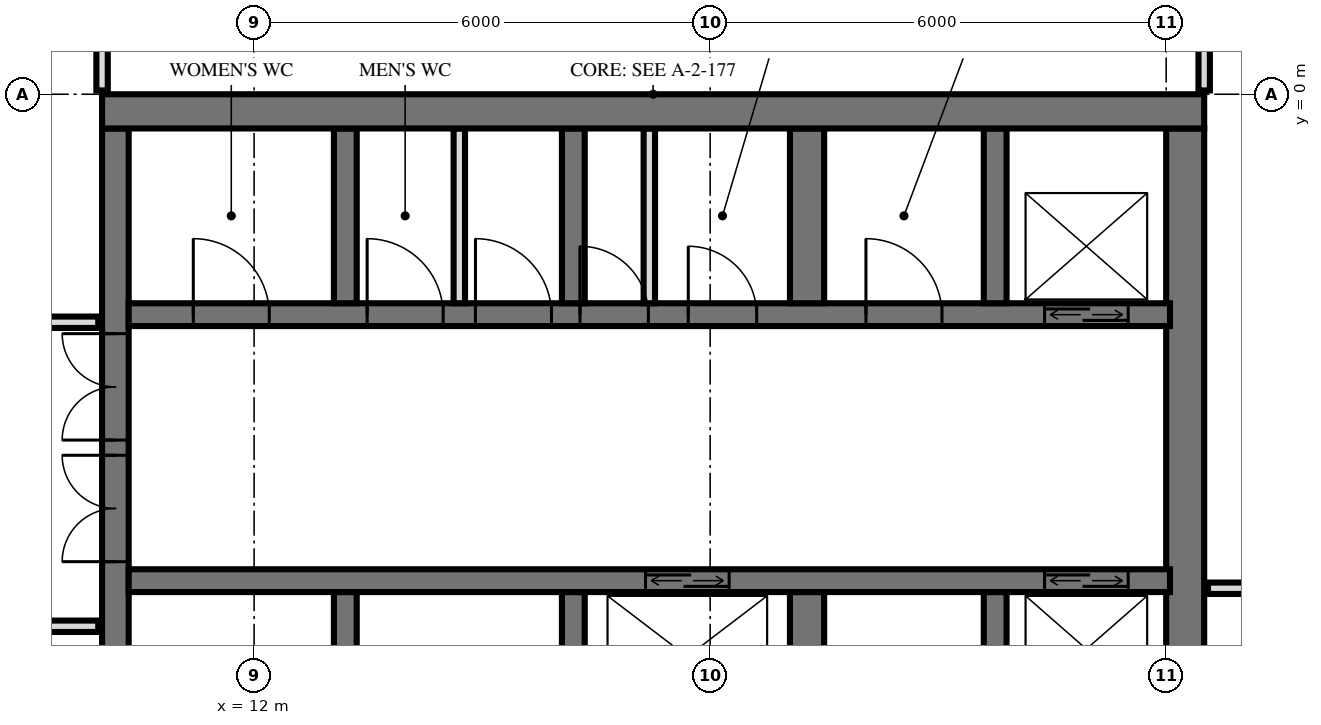
"""IFC4 building model, lengths in metres.
Left out: names, types, materials, properties, quantities, classifications, styles, units other than length and angle.
Written with IfcOpenShell. Run it as: python <this file> out.ifc"""

import sys

from ifc_helpers import new_model, si_unit, direction, frame, frame_2d, origin, place, context, subcontext, project, spatial, rectangle, extrude, element, fill, save


model = new_model("IFC4")
c1 = context("Model", 3, precision=1e-05, world=origin(), true_north=direction((0.0, 1.0)))
c2 = subcontext(c1, "Body", "Model", "MODEL_VIEW")
j1 = project(units=[si_unit("LENGTHUNIT", "METRE"), si_unit("PLANEANGLEUNIT", "RADIAN")], contexts=[c1])
p1 = place(None, origin())
s1 = spatial("IfcSite", under=j1, at=p1, CompositionType="ELEMENT")
p2 = place(p1, origin())
s2 = spatial("IfcBuilding", under=s1, at=p2, CompositionType="ELEMENT")
p3 = place(p2, frame((0.0, 0.0, 163.2)))
s3 = spatial("IfcBuildingStorey", under=s2, at=p3, CompositionType="ELEMENT", Elevation=163.2)
p4 = place(p3, frame((10.0, -0.225, 0.0), z_axis=(0.0, 0.0, 1.0), x_axis=(1.0, 0.0, 0.0)))
e1 = element("IfcWall", 1, at=p4, inside=s3, PredefinedType="SHEAR", context=c2, shape_type="SweptSolid", body=[
    extrude(rectangle(XDim=14.5, YDim=0.45, at=frame_2d((7.25, 0.0))), origin(), (0.0, 0.0, 1.0), 3.6),
])
p5 = place(p3, frame((10.175, -14.55, 0.0), z_axis=(0.0, 0.0, 1.0), x_axis=(0.0, 1.0, 0.0)))
e2 = element("IfcWall", 2, at=p5, inside=s3, PredefinedType="SHEAR", context=c2, shape_type="SweptSolid", body=[
    extrude(rectangle(XDim=14.1, YDim=0.35, at=frame_2d((7.05, 0.0))), origin(), (0.0, 0.0, 1.0), 3.6),
])
p6 = place(p5, frame((8.4, 0.0, 0.0)))
e3 = element("IfcOpeningElement", 3, at=p6, cuts=e2, PredefinedType="OPENING", context=c2, shape_type="SweptSolid", body=[
    extrude(rectangle(XDim=1.4, YDim=2.4, at=frame_2d((0.7, 1.2))), frame((0.0, 0.185, 0.0), z_axis=(0.0, -1.0, 0.0), x_axis=(1.0, 0.0, 0.0)), (0.0, 0.0, 1.0), 0.37),
])
p7 = place(p5, frame((10.0, 0.0, 0.0)))
e4 = element("IfcOpeningElement", 4, at=p7, cuts=e2, PredefinedType="OPENING", context=c2, shape_type="SweptSolid", body=[
    extrude(rectangle(XDim=1.4, YDim=2.4, at=frame_2d((0.7, 1.2))), frame((0.0, 0.185, 0.0), z_axis=(0.0, -1.0, 0.0), x_axis=(1.0, 0.0, 0.0)), (0.0, 0.0, 1.0), 0.37),
])
p8 = place(p5, frame((4.0, 0.0, 0.0)))
e5 = element("IfcOpeningElement", 5, at=p8, cuts=e2, PredefinedType="OPENING", context=c2, shape_type="SweptSolid", body=[
    extrude(rectangle(XDim=1.2, YDim=2.1, at=frame_2d((0.6, 1.05))), frame((0.0, 0.185, 0.0), z_axis=(0.0, -1.0, 0.0), x_axis=(1.0, 0.0, 0.0)), (0.0, 0.0, 1.0), 0.37),
])
p9 = place(p3, frame((24.25, -14.55, 0.0), z_axis=(0.0, 0.0, 1.0), x_axis=(0.0, 1.0, 0.0)))
e6 = element("IfcWall", 6, at=p9, inside=s3, PredefinedType="SHEAR", context=c2, shape_type="SweptSolid", body=[
    extrude(rectangle(XDim=14.1, YDim=0.5, at=frame_2d((7.05, 0.0))), origin(), (0.0, 0.0, 1.0), 3.6),
])
p10 = place(p3, frame((10.35, -2.9, 0.0), z_axis=(0.0, 0.0, 1.0), x_axis=(1.0, 0.0, 0.0)))
e7 = element("IfcWall", 7, at=p10, inside=s3, PredefinedType="SHEAR", context=c2, shape_type="SweptSolid", body=[
    extrude(rectangle(XDim=13.7, YDim=0.3, at=frame_2d((6.85, 0.0))), origin(), (0.0, 0.0, 1.0), 3.6),
])
p11 = place(p10, frame((12.05, 0.0, 0.0)))
e8 = element("IfcOpeningElement", 8, at=p11, cuts=e7, PredefinedType="OPENING", context=c2, shape_type="SweptSolid", body=[
    extrude(rectangle(XDim=1.1, YDim=2.1, at=frame_2d((0.55, 1.05))), frame((0.0, 0.16, 0.0), z_axis=(0.0, -1.0, 0.0), x_axis=(1.0, 0.0, 0.0)), (0.0, 0.0, 1.0), 0.32),
])
p12 = place(p10, frame((5.938, 0.0, 0.0)))
e9 = element("IfcOpeningElement", 9, at=p12, cuts=e7, PredefinedType="OPENING", context=c2, shape_type="SweptSolid", body=[
    extrude(rectangle(XDim=0.9, YDim=2.1, at=frame_2d((0.45, 1.05))), frame((0.0, 0.16, 0.0), z_axis=(0.0, -1.0, 0.0), x_axis=(1.0, 0.0, 0.0)), (0.0, 0.0, 1.0), 0.32),
])
p13 = place(p10, frame((7.363, 0.0, 0.0)))
e10 = element("IfcOpeningElement", 10, at=p13, cuts=e7, PredefinedType="OPENING", context=c2, shape_type="SweptSolid", body=[
    extrude(rectangle(XDim=0.9, YDim=2.1, at=frame_2d((0.45, 1.05))), frame((0.0, 0.16, 0.0), z_axis=(0.0, -1.0, 0.0), x_axis=(1.0, 0.0, 0.0)), (0.0, 0.0, 1.0), 0.32),
])
p14 = place(p10, frame((0.85, 0.0, 0.0)))
e11 = element("IfcOpeningElement", 11, at=p14, cuts=e7, PredefinedType="OPENING", context=c2, shape_type="SweptSolid", body=[
    extrude(rectangle(XDim=1.0, YDim=2.1, at=frame_2d((0.5, 1.05))), frame((0.0, 0.16, 0.0), z_axis=(0.0, -1.0, 0.0), x_axis=(1.0, 0.0, 0.0)), (0.0, 0.0, 1.0), 0.32),
])
p15 = place(p10, frame((3.137, 0.0, 0.0)))
e12 = element("IfcOpeningElement", 12, at=p15, cuts=e7, PredefinedType="OPENING", context=c2, shape_type="SweptSolid", body=[
    extrude(rectangle(XDim=1.0, YDim=2.1, at=frame_2d((0.5, 1.05))), frame((0.0, 0.16, 0.0), z_axis=(0.0, -1.0, 0.0), x_axis=(1.0, 0.0, 0.0)), (0.0, 0.0, 1.0), 0.32),
])
p16 = place(p10, frame((4.562, 0.0, 0.0)))
e13 = element("IfcOpeningElement", 13, at=p16, cuts=e7, PredefinedType="OPENING", context=c2, shape_type="SweptSolid", body=[
    extrude(rectangle(XDim=1.0, YDim=2.1, at=frame_2d((0.5, 1.05))), frame((0.0, 0.16, 0.0), z_axis=(0.0, -1.0, 0.0), x_axis=(1.0, 0.0, 0.0)), (0.0, 0.0, 1.0), 0.32),
])
p17 = place(p10, frame((9.7, 0.0, 0.0)))
e14 = element("IfcOpeningElement", 14, at=p17, cuts=e7, PredefinedType="OPENING", context=c2, shape_type="SweptSolid", body=[
    extrude(rectangle(XDim=1.0, YDim=2.1, at=frame_2d((0.5, 1.05))), frame((0.0, 0.16, 0.0), z_axis=(0.0, -1.0, 0.0), x_axis=(1.0, 0.0, 0.0)), (0.0, 0.0, 1.0), 0.32),
])
p18 = place(p3, frame((10.35, -6.4, 0.0), z_axis=(0.0, 0.0, 1.0), x_axis=(1.0, 0.0, 0.0)))
e15 = element("IfcWall", 15, at=p18, inside=s3, PredefinedType="SHEAR", context=c2, shape_type="SweptSolid", body=[
    extrude(rectangle(XDim=13.7, YDim=0.3, at=frame_2d((6.85, 0.0))), origin(), (0.0, 0.0, 1.0), 3.6),
])
p19 = place(p18, frame((12.05, 0.0, 0.0)))
e16 = element("IfcOpeningElement", 16, at=p19, cuts=e15, PredefinedType="OPENING", context=c2, shape_type="SweptSolid", body=[
    extrude(rectangle(XDim=1.1, YDim=2.1, at=frame_2d((0.55, 1.05))), frame((0.0, 0.16, 0.0), z_axis=(0.0, -1.0, 0.0), x_axis=(1.0, 0.0, 0.0)), (0.0, 0.0, 1.0), 0.32),
])
p20 = place(p18, frame((6.8, 0.0, 0.0)))
e17 = element("IfcOpeningElement", 17, at=p20, cuts=e15, PredefinedType="OPENING", context=c2, shape_type="SweptSolid", body=[
    extrude(rectangle(XDim=1.1, YDim=2.1, at=frame_2d((0.55, 1.05))), frame((0.0, 0.16, 0.0), z_axis=(0.0, -1.0, 0.0), x_axis=(1.0, 0.0, 0.0)), (0.0, 0.0, 1.0), 0.32),
])
for number, where, z_axis, x_axis in (
    (18, (13.2, -2.75, 0.0), (0.0, 0.0, 1.0), (0.0, 1.0, 0.0)),
    (19, (13.2, -8.85, 0.0), (0.0, 0.0, 1.0), (0.0, 1.0, 0.0)),
    (20, (16.2, -2.75, 0.0), (0.0, 0.0, 1.0), (0.0, 1.0, 0.0)),
    (21, (16.2, -8.85, 0.0), (0.0, 0.0, 1.0), (0.0, 1.0, 0.0)),
):
    element("IfcWall", number, at=place(p3, frame(where, z_axis=z_axis, x_axis=x_axis)), inside=s3, PredefinedType="SHEAR", context=c2, shape_type="SweptSolid", body=[
        extrude(rectangle(XDim=2.3, YDim=0.3, at=frame_2d((1.15, 0.0))), origin(), (0.0, 0.0, 1.0), 3.6),
    ])
for number, where, z_axis, x_axis in (
    (22, (19.275, -2.75, 0.0), (0.0, 0.0, 1.0), (0.0, 1.0, 0.0)),
    (23, (19.275, -8.85, 0.0), (0.0, 0.0, 1.0), (0.0, 1.0, 0.0)),
):
    element("IfcWall", number, at=place(p3, frame(where, z_axis=z_axis, x_axis=x_axis)), inside=s3, PredefinedType="SHEAR", context=c2, shape_type="SweptSolid", body=[
        extrude(rectangle(XDim=2.3, YDim=0.45, at=frame_2d((1.15, 0.0))), origin(), (0.0, 0.0, 1.0), 3.6),
    ])
for number, where, z_axis, x_axis in (
    (24, (21.75, -2.75, 0.0), (0.0, 0.0, 1.0), (0.0, 1.0, 0.0)),
    (25, (21.75, -8.85, 0.0), (0.0, 0.0, 1.0), (0.0, 1.0, 0.0)),
):
    element("IfcWall", number, at=place(p3, frame(where, z_axis=z_axis, x_axis=x_axis)), inside=s3, PredefinedType="SHEAR", context=c2, shape_type="SweptSolid", body=[
        extrude(rectangle(XDim=2.3, YDim=0.3, at=frame_2d((1.15, 0.0))), origin(), (0.0, 0.0, 1.0), 3.6),
    ])
for number, where, z_axis, x_axis in (
    (26, (17.2, -2.75, 0.0), (0.0, 0.0, 1.0), (0.0, 1.0, 0.0)),
    (27, (14.7, -2.75, 0.0), (0.0, 0.0, 1.0), (0.0, 1.0, 0.0)),
):
    element("IfcWall", number, at=place(p3, frame(where, z_axis=z_axis, x_axis=x_axis)), inside=s3, PredefinedType="PARTITIONING", context=c2, shape_type="SweptSolid", body=[
        extrude(rectangle(XDim=2.3, YDim=0.15, at=frame_2d((1.15, 0.0))), origin(), (0.0, 0.0, 1.0), 3.3),
    ])
p21 = place(p3, frame((24.5, 0.05, 0.0), z_axis=(0.0, 0.0, 1.0), x_axis=(0.0, 1.0, 0.0)))
e28 = element("IfcWall", 28, at=p21, inside=s3, PredefinedType="PARTITIONING", context=c2, shape_type="SweptSolid", body=[
    extrude(rectangle(XDim=0.807, YDim=0.15, at=frame_2d((0.404, 0.0))), origin(), (0.0, 0.0, 1.0), 3.32),
])
p22 = place(p3, frame((10.0, 0.05, 0.0), z_axis=(0.0, 0.0, 1.0), x_axis=(0.0, 1.0, 0.0)))
e29 = element("IfcWall", 29, at=p22, inside=s3, PredefinedType="PARTITIONING", context=c2, shape_type="SweptSolid", body=[
    extrude(rectangle(XDim=0.97, YDim=0.15, at=frame_2d((0.485, 0.0))), origin(), (0.0, 0.0, 1.0), 3.32),
])
p23 = place(p3, frame((-9.95, -7.0, 0.0), z_axis=(0.0, 0.0, 1.0), x_axis=(1.0, 0.0, 0.0)))
e30 = element("IfcWall", 30, at=p23, inside=s3, PredefinedType="PARTITIONING", context=c2, shape_type="SweptSolid", body=[
    extrude(rectangle(XDim=19.9, YDim=0.15, at=frame_2d((9.95, 0.0))), origin(), (0.0, 0.0, 1.0), 3.32),
])
p24 = place(p23, frame((9.45, 0.0, 0.0)))
e31 = element("IfcOpeningElement", 31, at=p24, cuts=e30, PredefinedType="OPENING", context=c2, shape_type="SweptSolid", body=[
    extrude(rectangle(XDim=1.0, YDim=2.1, at=frame_2d((0.5, 1.05))), frame((0.0, 0.085, 0.0), z_axis=(0.0, -1.0, 0.0), x_axis=(1.0, 0.0, 0.0)), (0.0, 0.0, 1.0), 0.17),
])
p25 = place(p23, frame((3.45, 0.0, 0.0)))
e32 = element("IfcOpeningElement", 32, at=p25, cuts=e30, PredefinedType="OPENING", context=c2, shape_type="SweptSolid", body=[
    extrude(rectangle(XDim=1.0, YDim=2.1, at=frame_2d((0.5, 1.05))), frame((0.0, 0.085, 0.0), z_axis=(0.0, -1.0, 0.0), x_axis=(1.0, 0.0, 0.0)), (0.0, 0.0, 1.0), 0.17),
])
p26 = place(p3, frame((24.55, -6.5, 0.0), z_axis=(0.0, 0.0, 1.0), x_axis=(1.0, 0.0, 0.0)))
e33 = element("IfcWall", 33, at=p26, inside=s3, PredefinedType="PARTITIONING", context=c2, shape_type="SweptSolid", body=[
    extrude(rectangle(XDim=3.47, YDim=0.15, at=frame_2d((1.735, 0.0))), origin(), (0.0, 0.0, 1.0), 3.32),
])
p27 = place(p26, frame((1.35, 0.0, 0.0)))
e34 = element("IfcOpeningElement", 34, at=p27, cuts=e33, PredefinedType="OPENING", context=c2, shape_type="SweptSolid", body=[
    extrude(rectangle(XDim=0.9, YDim=2.1, at=frame_2d((0.45, 1.05))), frame((0.0, 0.085, 0.0), z_axis=(0.0, -1.0, 0.0), x_axis=(1.0, 0.0, 0.0)), (0.0, 0.0, 1.0), 0.17),
])
p28 = place(p3, frame((-9.95, -3.0, 0.0), z_axis=(0.0, 0.0, 1.0), x_axis=(1.0, 0.0, 0.0)))
e35 = element("IfcWall", 35, at=p28, inside=s3, PredefinedType="PARTITIONING", context=c2, shape_type="SweptSolid", body=[
    extrude(rectangle(XDim=19.9, YDim=0.15, at=frame_2d((9.95, 0.0))), origin(), (0.0, 0.0, 1.0), 3.32),
])
p29 = place(p28, frame((1.45, 0.0, 0.0)))
e36 = element("IfcOpeningElement", 36, at=p29, cuts=e35, PredefinedType="OPENING", context=c2, shape_type="SweptSolid", body=[
    extrude(rectangle(XDim=1.0, YDim=2.1, at=frame_2d((0.5, 1.05))), frame((0.0, 0.085, 0.0), z_axis=(0.0, -1.0, 0.0), x_axis=(1.0, 0.0, 0.0)), (0.0, 0.0, 1.0), 0.17),
])
p30 = place(p28, frame((4.95, 0.0, 0.0)))
e37 = element("IfcOpeningElement", 37, at=p30, cuts=e35, PredefinedType="OPENING", context=c2, shape_type="SweptSolid", body=[
    extrude(rectangle(XDim=1.0, YDim=2.1, at=frame_2d((0.5, 1.05))), frame((0.0, 0.085, 0.0), z_axis=(0.0, -1.0, 0.0), x_axis=(1.0, 0.0, 0.0)), (0.0, 0.0, 1.0), 0.17),
])
p31 = place(p28, frame((7.7, 0.0, 0.0)))
e38 = element("IfcOpeningElement", 38, at=p31, cuts=e35, PredefinedType="OPENING", context=c2, shape_type="SweptSolid", body=[
    extrude(rectangle(XDim=1.0, YDim=2.1, at=frame_2d((0.5, 1.05))), frame((0.0, 0.085, 0.0), z_axis=(0.0, -1.0, 0.0), x_axis=(1.0, 0.0, 0.0)), (0.0, 0.0, 1.0), 0.17),
])
p32 = place(p28, frame((14.2, 0.0, 0.0)))
e39 = element("IfcOpeningElement", 39, at=p32, cuts=e35, PredefinedType="OPENING", context=c2, shape_type="SweptSolid", body=[
    extrude(rectangle(XDim=1.0, YDim=2.1, at=frame_2d((0.5, 1.05))), frame((0.0, 0.085, 0.0), z_axis=(0.0, -1.0, 0.0), x_axis=(1.0, 0.0, 0.0)), (0.0, 0.0, 1.0), 0.17),
])
p33 = place(p11, origin())
e40 = element("IfcDoor", 40, at=p33, inside=s3, OperationType="DOUBLE_DOOR_SLIDING", PredefinedType="USERDEFINED", context=c2, shape_type="SweptSolid", body=[
    extrude(rectangle(XDim=1.1, YDim=2.1, at=frame_2d((0.55, 1.05))), frame((0.0, 0.025, 0.0), z_axis=(0.0, -1.0, 0.0), x_axis=(1.0, 0.0, 0.0)), (0.0, 0.0, 1.0), 0.05),
])
fill(e8, e40)
p34 = place(p19, origin())
e41 = element("IfcDoor", 41, at=p34, inside=s3, OperationType="DOUBLE_DOOR_SLIDING", PredefinedType="USERDEFINED", context=c2, shape_type="SweptSolid", body=[
    extrude(rectangle(XDim=1.1, YDim=2.1, at=frame_2d((0.55, 1.05))), frame((0.0, 0.025, 0.0), z_axis=(0.0, -1.0, 0.0), x_axis=(1.0, 0.0, 0.0)), (0.0, 0.0, 1.0), 0.05),
])
fill(e16, e41)
p35 = place(p20, origin())
e42 = element("IfcDoor", 42, at=p35, inside=s3, OperationType="DOUBLE_DOOR_SLIDING", PredefinedType="USERDEFINED", context=c2, shape_type="SweptSolid", body=[
    extrude(rectangle(XDim=1.1, YDim=2.1, at=frame_2d((0.55, 1.05))), frame((0.0, 0.025, 0.0), z_axis=(0.0, -1.0, 0.0), x_axis=(1.0, 0.0, 0.0)), (0.0, 0.0, 1.0), 0.05),
])
fill(e17, e42)
p36 = place(p6, origin())
e43 = element("IfcDoor", 43, at=p36, inside=s3, OperationType="DOUBLE_DOOR_SINGLE_SWING", PredefinedType="DOOR", context=c2, shape_type="SweptSolid", body=[
    extrude(rectangle(XDim=1.4, YDim=2.4, at=frame_2d((0.7, 1.2))), frame((0.0, 0.025, 0.0), z_axis=(0.0, -1.0, 0.0), x_axis=(1.0, 0.0, 0.0)), (0.0, 0.0, 1.0), 0.05),
])
fill(e3, e43)
p37 = place(p7, origin())
e44 = element("IfcDoor", 44, at=p37, inside=s3, OperationType="DOUBLE_DOOR_SINGLE_SWING", PredefinedType="DOOR", context=c2, shape_type="SweptSolid", body=[
    extrude(rectangle(XDim=1.4, YDim=2.4, at=frame_2d((0.7, 1.2))), frame((0.0, 0.025, 0.0), z_axis=(0.0, -1.0, 0.0), x_axis=(1.0, 0.0, 0.0)), (0.0, 0.0, 1.0), 0.05),
])
fill(e4, e44)
p38 = place(p12, origin())
e45 = element("IfcDoor", 45, at=p38, inside=s3, OperationType="SINGLE_SWING_RIGHT", PredefinedType="DOOR", context=c2, shape_type="SweptSolid", body=[
    extrude(rectangle(XDim=0.9, YDim=2.1, at=frame_2d((0.45, 1.05))), frame((0.0, 0.025, 0.0), z_axis=(0.0, -1.0, 0.0), x_axis=(1.0, 0.0, 0.0)), (0.0, 0.0, 1.0), 0.05),
])
fill(e9, e45)
p39 = place(p13, origin())
e46 = element("IfcDoor", 46, at=p39, inside=s3, OperationType="SINGLE_SWING_RIGHT", PredefinedType="DOOR", context=c2, shape_type="SweptSolid", body=[
    extrude(rectangle(XDim=0.9, YDim=2.1, at=frame_2d((0.45, 1.05))), frame((0.0, 0.025, 0.0), z_axis=(0.0, -1.0, 0.0), x_axis=(1.0, 0.0, 0.0)), (0.0, 0.0, 1.0), 0.05),
])
fill(e10, e46)
p40 = place(p14, origin())
e47 = element("IfcDoor", 47, at=p40, inside=s3, OperationType="SINGLE_SWING_RIGHT", PredefinedType="DOOR", context=c2, shape_type="SweptSolid", body=[
    extrude(rectangle(XDim=1.0, YDim=2.1, at=frame_2d((0.5, 1.05))), frame((0.0, 0.025, 0.0), z_axis=(0.0, -1.0, 0.0), x_axis=(1.0, 0.0, 0.0)), (0.0, 0.0, 1.0), 0.05),
])
fill(e11, e47)
p41 = place(p15, origin())
e48 = element("IfcDoor", 48, at=p41, inside=s3, OperationType="SINGLE_SWING_RIGHT", PredefinedType="DOOR", context=c2, shape_type="SweptSolid", body=[
    extrude(rectangle(XDim=1.0, YDim=2.1, at=frame_2d((0.5, 1.05))), frame((0.0, 0.025, 0.0), z_axis=(0.0, -1.0, 0.0), x_axis=(1.0, 0.0, 0.0)), (0.0, 0.0, 1.0), 0.05),
])
fill(e12, e48)
p42 = place(p16, origin())
e49 = element("IfcDoor", 49, at=p42, inside=s3, OperationType="SINGLE_SWING_RIGHT", PredefinedType="DOOR", context=c2, shape_type="SweptSolid", body=[
    extrude(rectangle(XDim=1.0, YDim=2.1, at=frame_2d((0.5, 1.05))), frame((0.0, 0.025, 0.0), z_axis=(0.0, -1.0, 0.0), x_axis=(1.0, 0.0, 0.0)), (0.0, 0.0, 1.0), 0.05),
])
fill(e13, e49)
p43 = place(p17, origin())
e50 = element("IfcDoor", 50, at=p43, inside=s3, OperationType="SINGLE_SWING_RIGHT", PredefinedType="DOOR", context=c2, shape_type="SweptSolid", body=[
    extrude(rectangle(XDim=1.0, YDim=2.1, at=frame_2d((0.5, 1.05))), frame((0.0, 0.025, 0.0), z_axis=(0.0, -1.0, 0.0), x_axis=(1.0, 0.0, 0.0)), (0.0, 0.0, 1.0), 0.05),
])
fill(e14, e50)
save(model, sys.argv[1])
